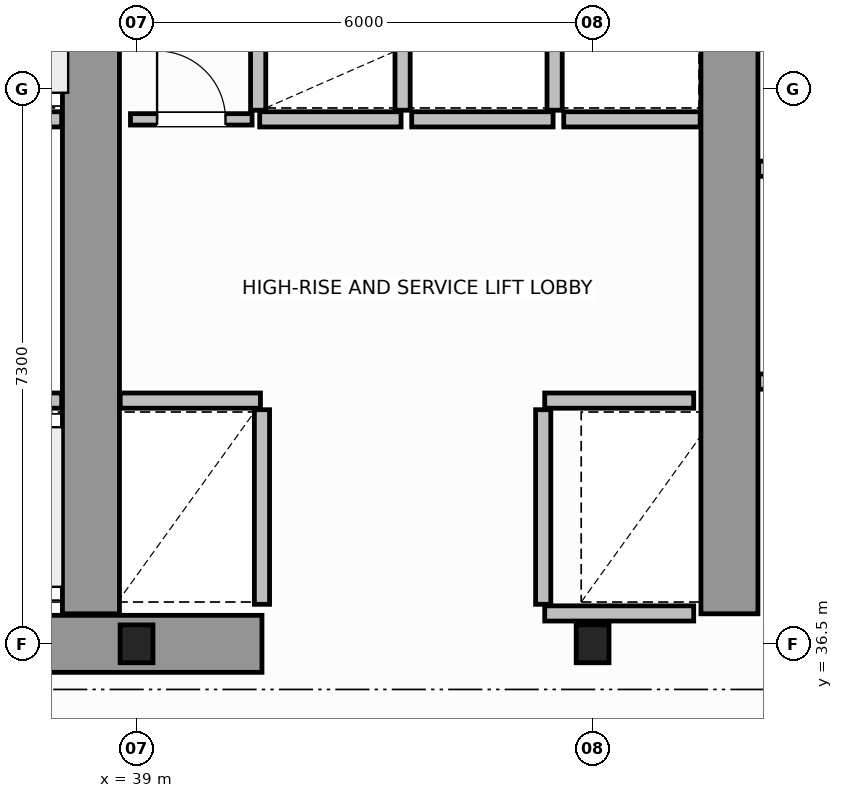
"""IFC4 building model, lengths in metres.
Left out: names, types, materials, properties, quantities, classifications, styles, units other than length and angle.
Written with IfcOpenShell. Run it as: python <this file> out.ifc"""

import sys

from ifc_helpers import new_model, si_unit, direction, frame, frame_2d, origin, origin_2d, place, context, subcontext, project, spatial, rectangle, i_section, extrude, source, transform, mapped, element, fill, save


model = new_model("IFC4")
c1 = context("Model", 3, precision=1e-05, world=origin(), true_north=direction((0.0, 1.0)))
c2 = subcontext(c1, "Body", "Model", "MODEL_VIEW")
j1 = project(units=[si_unit("LENGTHUNIT", "METRE"), si_unit("PLANEANGLEUNIT", "RADIAN")], contexts=[c1])
p1 = place(None, origin())
s1 = spatial("IfcSite", under=j1, at=p1, CompositionType="ELEMENT")
p2 = place(p1, origin())
s2 = spatial("IfcBuilding", under=s1, at=p2, CompositionType="ELEMENT")
p3 = place(p2, frame((0.0, 0.0, 141.4)))
s3 = spatial("IfcBuildingStorey", under=s2, at=p3, CompositionType="ELEMENT", Elevation=141.4)
m1 = source(origin(), c2, "Body", "SweptSolid", [
    extrude(i_section(OverallWidth=0.432, OverallDepth=0.498, WebThickness=0.055, FlangeThickness=0.068, FilletRadius=0.015, at=origin_2d()), origin(), (0.0, 0.0, 1.0), 3.8),
])
for number, where, z_axis, x_axis in (
    (1, (39.0, 36.5, 0.0), (0.0, 0.0, 1.0), (1.0, 0.0, 0.0)),
    (2, (45.0, 36.5, 0.0), (0.0, 0.0, 1.0), (1.0, 0.0, 0.0)),
):
    element("IfcColumn", number, at=place(p3, frame(where, z_axis=z_axis, x_axis=x_axis)), inside=s3, PredefinedType="COLUMN", context=c2, shape_type="MappedRepresentation", body=[
        mapped(m1, transform((0.0, 0.0, 0.0), scale=1.0)),
    ])
p4 = place(p3, frame((36.15, 36.5, 0.0), z_axis=(0.0, 0.0, 1.0), x_axis=(1.0, 0.0, 0.0)))
e3 = element("IfcWall", 3, at=p4, inside=s3, PredefinedType="SHEAR", context=c2, shape_type="SweptSolid", body=[
    extrude(rectangle(XDim=4.5, YDim=0.75, at=frame_2d((2.25, 0.0))), origin(), (0.0, 0.0, 1.0), 3.8),
])
for number, where, z_axis, x_axis in (
    (4, (38.4, 36.895, 0.0), (0.0, 0.0, 1.0), (0.0, 1.0, 0.0)),
    (5, (46.8, 36.895, 0.0), (0.0, 0.0, 1.0), (0.0, 1.0, 0.0)),
):
    element("IfcWall", number, at=place(p3, frame(where, z_axis=z_axis, x_axis=x_axis)), inside=s3, PredefinedType="SHEAR", context=c2, shape_type="SweptSolid", body=[
        extrude(rectangle(XDim=9.305, YDim=0.75, at=frame_2d((4.652, 0.0))), origin(), (0.0, 0.0, 1.0), 3.8),
    ])
p5 = place(p3, frame((36.17, 39.7, 0.0), z_axis=(0.0, 0.0, 1.0), x_axis=(1.0, 0.0, 0.0)))
e6 = element("IfcWall", 6, at=p5, inside=s3, PredefinedType="SOLIDWALL", context=c2, shape_type="SweptSolid", body=[
    extrude(rectangle(XDim=1.845, YDim=0.2, at=frame_2d((0.922, 0.0))), origin(), (0.0, 0.0, 1.0), 3.58),
])
p6 = place(p5, frame((0.372, 0.0, 0.0)))
e7 = element("IfcOpeningElement", 7, at=p6, cuts=e6, PredefinedType="OPENING", context=c2, shape_type="SweptSolid", body=[
    extrude(rectangle(XDim=1.1, YDim=2.15, at=frame_2d((0.55, 1.075))), frame((0.0, 0.11, 0.0), z_axis=(0.0, -1.0, 0.0), x_axis=(1.0, 0.0, 0.0)), (0.0, 0.0, 1.0), 0.22),
])
p7 = place(p3, frame((36.29, 43.4, 0.0), z_axis=(0.0, 0.0, 1.0), x_axis=(1.0, 0.0, 0.0)))
e8 = element("IfcWall", 8, at=p7, inside=s3, PredefinedType="SOLIDWALL", context=c2, shape_type="SweptSolid", body=[
    extrude(rectangle(XDim=1.725, YDim=0.2, at=frame_2d((0.862, 0.0))), origin(), (0.0, 0.0, 1.0), 3.58),
])
p8 = place(p7, frame((0.313, 0.0, 0.0)))
e9 = element("IfcOpeningElement", 9, at=p8, cuts=e8, PredefinedType="OPENING", context=c2, shape_type="SweptSolid", body=[
    extrude(rectangle(XDim=1.1, YDim=2.15, at=frame_2d((0.55, 1.075))), frame((0.0, 0.11, 0.0), z_axis=(0.0, -1.0, 0.0), x_axis=(1.0, 0.0, 0.0)), (0.0, 0.0, 1.0), 0.22),
])
p9 = place(p3, frame((38.785, 39.7, 0.0), z_axis=(0.0, 0.0, 1.0), x_axis=(1.0, 0.0, 0.0)))
e10 = element("IfcWall", 10, at=p9, inside=s3, PredefinedType="SOLIDWALL", context=c2, shape_type="SweptSolid", body=[
    extrude(rectangle(XDim=1.845, YDim=0.2, at=frame_2d((0.922, 0.0))), origin(), (0.0, 0.0, 1.0), 3.58),
])
p10 = place(p3, frame((40.65, 37.02, 0.0), z_axis=(0.0, 0.0, 1.0), x_axis=(0.0, 1.0, 0.0)))
e11 = element("IfcWall", 11, at=p10, inside=s3, PredefinedType="SOLIDWALL", context=c2, shape_type="SweptSolid", body=[
    extrude(rectangle(XDim=2.56, YDim=0.2, at=frame_2d((1.28, 0.0))), origin(), (0.0, 0.0, 1.0), 3.58),
])
p11 = place(p3, frame((44.37, 39.7, 0.0), z_axis=(0.0, 0.0, 1.0), x_axis=(1.0, 0.0, 0.0)))
e12 = element("IfcWall", 12, at=p11, inside=s3, PredefinedType="SOLIDWALL", context=c2, shape_type="SweptSolid", body=[
    extrude(rectangle(XDim=1.96, YDim=0.2, at=frame_2d((0.98, 0.0))), origin(), (0.0, 0.0, 1.0), 3.58),
])
p12 = place(p3, frame((44.37, 36.9, 0.0), z_axis=(0.0, 0.0, 1.0), x_axis=(1.0, 0.0, 0.0)))
e13 = element("IfcWall", 13, at=p12, inside=s3, PredefinedType="SOLIDWALL", context=c2, shape_type="SweptSolid", body=[
    extrude(rectangle(XDim=1.96, YDim=0.2, at=frame_2d((0.98, 0.0))), origin(), (0.0, 0.0, 1.0), 2.37),
])
p13 = place(p3, frame((44.35, 37.02, 0.0), z_axis=(0.0, 0.0, 1.0), x_axis=(0.0, 1.0, 0.0)))
e14 = element("IfcWall", 14, at=p13, inside=s3, PredefinedType="SOLIDWALL", context=c2, shape_type="SweptSolid", body=[
    extrude(rectangle(XDim=2.56, YDim=0.2, at=frame_2d((1.28, 0.0))), origin(), (0.0, 0.0, 1.0), 3.58),
])
p14 = place(p3, frame((40.62, 43.4, 0.0), z_axis=(0.0, 0.0, 1.0), x_axis=(1.0, 0.0, 0.0)))
e15 = element("IfcWall", 15, at=p14, inside=s3, PredefinedType="SOLIDWALL", context=c2, shape_type="SweptSolid", body=[
    extrude(rectangle(XDim=1.86, YDim=0.2, at=frame_2d((0.93, 0.0))), origin(), (0.0, 0.0, 1.0), 3.58),
])
for number, where, z_axis, x_axis in (
    (16, (40.6, 43.52, 0.0), (0.0, 0.0, 1.0), (0.0, 1.0, 0.0)),
    (17, (42.5, 43.52, 0.0), (0.0, 0.0, 1.0), (0.0, 1.0, 0.0)),
):
    element("IfcWall", number, at=place(p3, frame(where, z_axis=z_axis, x_axis=x_axis)), inside=s3, PredefinedType="SOLIDWALL", context=c2, shape_type="SweptSolid", body=[
        extrude(rectangle(XDim=2.56, YDim=0.2, at=frame_2d((1.28, 0.0))), origin(), (0.0, 0.0, 1.0), 3.58),
    ])
p15 = place(p3, frame((42.62, 43.4, 0.0), z_axis=(0.0, 0.0, 1.0), x_axis=(1.0, 0.0, 0.0)))
e18 = element("IfcWall", 18, at=p15, inside=s3, PredefinedType="SOLIDWALL", context=c2, shape_type="SweptSolid", body=[
    extrude(rectangle(XDim=1.86, YDim=0.2, at=frame_2d((0.93, 0.0))), origin(), (0.0, 0.0, 1.0), 3.58),
])
p16 = place(p3, frame((44.5, 43.52, 0.0), z_axis=(0.0, 0.0, 1.0), x_axis=(0.0, 1.0, 0.0)))
e19 = element("IfcWall", 19, at=p16, inside=s3, PredefinedType="SOLIDWALL", context=c2, shape_type="SweptSolid", body=[
    extrude(rectangle(XDim=2.56, YDim=0.2, at=frame_2d((1.28, 0.0))), origin(), (0.0, 0.0, 1.0), 3.58),
])
p17 = place(p3, frame((44.62, 43.4, 0.0), z_axis=(0.0, 0.0, 1.0), x_axis=(1.0, 0.0, 0.0)))
e20 = element("IfcWall", 20, at=p17, inside=s3, PredefinedType="SOLIDWALL", context=c2, shape_type="SweptSolid", body=[
    extrude(rectangle(XDim=1.795, YDim=0.2, at=frame_2d((0.897, 0.0))), origin(), (0.0, 0.0, 1.0), 3.58),
])
p18 = place(p3, frame((47.185, 39.95, 0.0), z_axis=(0.0, 0.0, 1.0), x_axis=(1.0, 0.0, 0.0)))
e21 = element("IfcWall", 21, at=p18, inside=s3, PredefinedType="SOLIDWALL", context=c2, shape_type="SweptSolid", body=[
    extrude(rectangle(XDim=2.145, YDim=0.2, at=frame_2d((1.073, 0.0))), origin(), (0.0, 0.0, 1.0), 3.58),
])
p19 = place(p18, frame((0.522, 0.0, 0.0)))
e22 = element("IfcOpeningElement", 22, at=p19, cuts=e21, PredefinedType="OPENING", context=c2, shape_type="SweptSolid", body=[
    extrude(rectangle(XDim=1.1, YDim=2.15, at=frame_2d((0.55, 1.075))), frame((0.0, 0.11, 0.0), z_axis=(0.0, -1.0, 0.0), x_axis=(1.0, 0.0, 0.0)), (0.0, 0.0, 1.0), 0.22),
])
p20 = place(p3, frame((47.185, 42.75, 0.0), z_axis=(0.0, 0.0, 1.0), x_axis=(1.0, 0.0, 0.0)))
e23 = element("IfcWall", 23, at=p20, inside=s3, PredefinedType="SOLIDWALL", context=c2, shape_type="SweptSolid", body=[
    extrude(rectangle(XDim=2.145, YDim=0.2, at=frame_2d((1.073, 0.0))), origin(), (0.0, 0.0, 1.0), 3.58),
])
p21 = place(p3, frame((38.92, 43.4, 0.0), z_axis=(0.0, 0.0, 1.0), x_axis=(1.0, 0.0, 0.0)))
e24 = element("IfcWall", 24, at=p21, inside=s3, PredefinedType="PARTITIONING", context=c2, shape_type="SweptSolid", body=[
    extrude(rectangle(XDim=1.6, YDim=0.15, at=frame_2d((0.8, 0.0))), origin(), (0.0, 0.0, 1.0), 3.58),
])
p22 = place(p21, frame((0.35, 0.0, 0.0)))
e25 = element("IfcOpeningElement", 25, at=p22, cuts=e24, PredefinedType="OPENING", context=c2, shape_type="SweptSolid", body=[
    extrude(rectangle(XDim=0.9, YDim=2.1, at=frame_2d((0.45, 1.05))), frame((0.0, 0.085, 0.0), z_axis=(0.0, -1.0, 0.0), x_axis=(1.0, 0.0, 0.0)), (0.0, 0.0, 1.0), 0.17),
])
m2 = source(origin(), c2, "Body", "SweptSolid", [
    extrude(rectangle(XDim=0.9, YDim=2.1, at=frame_2d((0.45, 1.05))), frame((0.0, 0.025, 0.0), z_axis=(0.0, -1.0, 0.0), x_axis=(1.0, 0.0, 0.0)), (0.0, 0.0, 1.0), 0.05),
])
p23 = place(p22, origin())
e26 = element("IfcDoor", 26, at=p23, inside=s3, OperationType="SINGLE_SWING_LEFT", PredefinedType="DOOR", context=c2, shape_type="MappedRepresentation", body=[
    mapped(m2, transform((0.0, 0.0, 0.0), scale=1.0)),
])
fill(e25, e26)
save(model, sys.argv[1])
